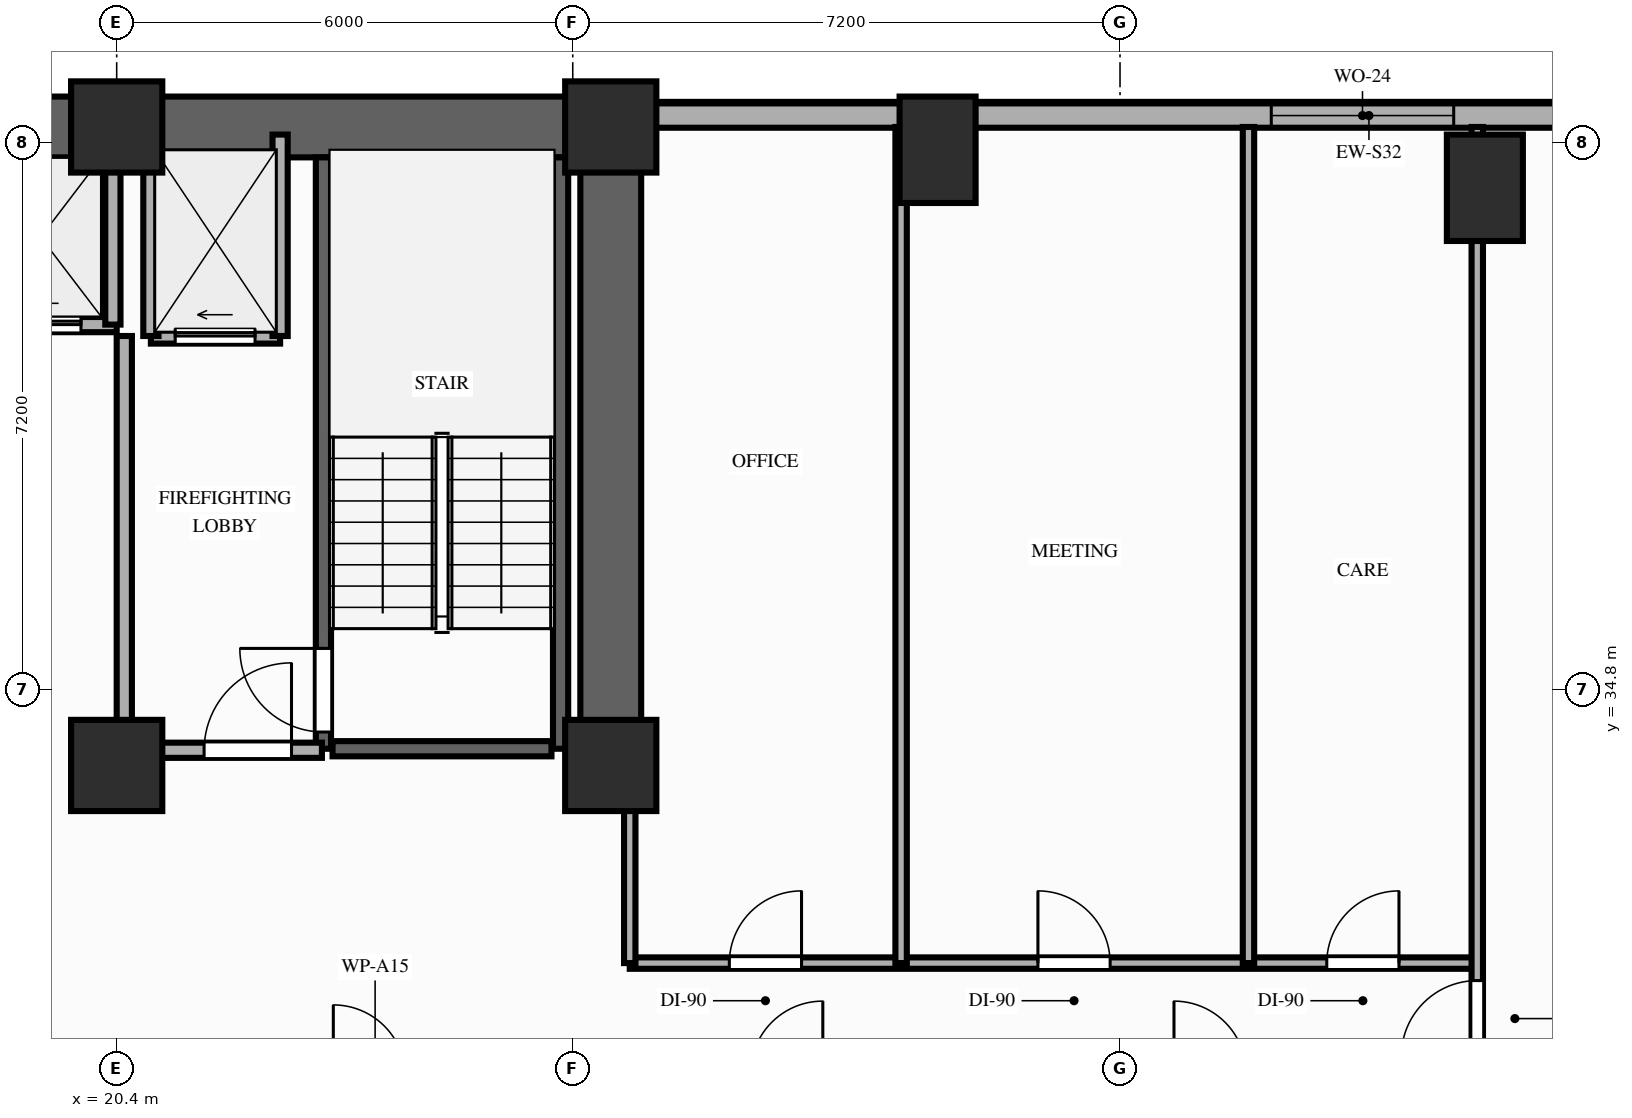
"""IFC4 building model, lengths in metres.
Left out: names, types, materials, properties, quantities, classifications, styles, units other than length and angle.
Written with IfcOpenShell. Run it as: python <this file> out.ifc"""

import sys

from ifc_helpers import new_model, si_unit, direction, frame, frame_2d, origin, origin_2d, place, context, subcontext, project, spatial, rectangle, extrude, element, fill, save


model = new_model("IFC4")
c1 = context("Model", 3, precision=1e-05, world=origin(), true_north=direction((0.0, 1.0)))
c2 = subcontext(c1, "Body", "Model", "MODEL_VIEW")
j1 = project(units=[si_unit("LENGTHUNIT", "METRE"), si_unit("PLANEANGLEUNIT", "RADIAN")], contexts=[c1])
p1 = place(None, origin())
s1 = spatial("IfcSite", under=j1, at=p1, CompositionType="ELEMENT")
p2 = place(p1, origin())
s2 = spatial("IfcBuilding", under=s1, at=p2, CompositionType="ELEMENT")
p3 = place(p2, frame((0.0, 0.0, 66.0)))
s3 = spatial("IfcBuildingStorey", under=s2, at=p3, CompositionType="ELEMENT", Elevation=66.0)
for number, where, z_axis, x_axis in (
    (1, (20.4, 33.8, 0.0), (0.0, 0.0, 1.0), (1.0, 0.0, 0.0)),
    (2, (26.9, 33.8, 0.0), (0.0, 0.0, 1.0), (1.0, 0.0, 0.0)),
    (3, (20.4, 42.2, 0.0), (0.0, 0.0, 1.0), (1.0, 0.0, 0.0)),
    (4, (26.9, 42.2, 0.0), (0.0, 0.0, 1.0), (1.0, 0.0, 0.0)),
):
    element("IfcColumn", number, at=place(p3, frame(where, z_axis=z_axis, x_axis=x_axis)), inside=s3, PredefinedType="COLUMN", context=c2, shape_type="SweptSolid", body=[
        extrude(rectangle(XDim=1.2, YDim=1.2, at=origin_2d()), origin(), (0.0, 0.0, 1.0), 3.2),
    ])
for number, where, z_axis, x_axis in (
    (5, (31.2, 41.9, 0.0), (0.0, 0.0, 1.0), (1.0, 0.0, 0.0)),
    (6, (38.4, 41.4, 0.0), (0.0, 0.0, 1.0), (1.0, 0.0, 0.0)),
):
    element("IfcColumn", number, at=place(p3, frame(where, z_axis=z_axis, x_axis=x_axis)), inside=s3, PredefinedType="COLUMN", context=c2, shape_type="SweptSolid", body=[
        extrude(rectangle(XDim=1.0, YDim=1.4, at=origin_2d()), origin(), (0.0, 0.0, 1.0), 3.2),
    ])
p4 = place(p3, frame((46.4, 42.35, 0.0), z_axis=(0.0, 0.0, 1.0), x_axis=(-1.0, 0.0, 0.0)))
e7 = element("IfcWall", 7, at=p4, inside=s3, PredefinedType="STANDARD", context=c2, shape_type="SweptSolid", body=[
    extrude(rectangle(XDim=19.05, YDim=0.32, at=frame_2d((9.525, 0.0))), origin(), (0.0, 0.0, 1.0), 2.41),
])
p5 = place(p4, frame((8.41, 0.0, 0.85)))
e8 = element("IfcOpeningElement", 8, at=p5, cuts=e7, PredefinedType="OPENING", context=c2, shape_type="SweptSolid", body=[
    extrude(rectangle(XDim=2.4, YDim=1.31, at=frame_2d((1.2, 0.655))), frame((0.0, 0.17, 0.0), z_axis=(0.0, -1.0, 0.0), x_axis=(1.0, 0.0, 0.0)), (0.0, 0.0, 1.0), 0.34),
])
p6 = place(p3, frame((6.45, 42.2, 0.0), z_axis=(0.0, 0.0, 1.0), x_axis=(1.0, 0.0, 0.0)))
e9 = element("IfcWall", 9, at=p6, inside=s3, PredefinedType="SHEAR", context=c2, shape_type="SweptSolid", body=[
    extrude(rectangle(XDim=20.45, YDim=0.8, at=frame_2d((10.225, 0.0))), origin(), (0.0, 0.0, 1.0), 3.02),
])
p7 = place(p3, frame((26.9, 33.8, 0.0), z_axis=(0.0, 0.0, 1.0), x_axis=(0.0, 1.0, 0.0)))
e10 = element("IfcWall", 10, at=p7, inside=s3, PredefinedType="SHEAR", context=c2, shape_type="SweptSolid", body=[
    extrude(rectangle(XDim=7.95, YDim=0.8, at=frame_2d((3.975, 0.0))), origin(), (0.0, 0.0, 1.0), 3.02),
])
p8 = place(p3, frame((23.12, 34.02, 0.0), z_axis=(0.0, 0.0, 1.0), x_axis=(0.0, 1.0, 0.0)))
e11 = element("IfcWall", 11, at=p8, inside=s3, PredefinedType="SHEAR", context=c2, shape_type="SweptSolid", body=[
    extrude(rectangle(XDim=7.78, YDim=0.2, at=frame_2d((3.89, 0.0))), origin(), (0.0, 0.0, 1.0), 3.02),
])
p9 = place(p8, frame((0.22, 0.0, 0.0)))
e12 = element("IfcOpeningElement", 12, at=p9, cuts=e11, PredefinedType="OPENING", context=c2, shape_type="SweptSolid", body=[
    extrude(rectangle(XDim=1.1, YDim=2.15, at=frame_2d((0.55, 1.075))), frame((0.0, 0.11, 0.0), z_axis=(0.0, -1.0, 0.0), x_axis=(1.0, 0.0, 0.0)), (0.0, 0.0, 1.0), 0.22),
])
p10 = place(p3, frame((26.24, 34.02, 0.0), z_axis=(0.0, 0.0, 1.0), x_axis=(0.0, 1.0, 0.0)))
e13 = element("IfcWall", 13, at=p10, inside=s3, PredefinedType="SHEAR", context=c2, shape_type="SweptSolid", body=[
    extrude(rectangle(XDim=7.78, YDim=0.2, at=frame_2d((3.89, 0.0))), origin(), (0.0, 0.0, 1.0), 3.02),
])
p11 = place(p3, frame((23.24, 34.02, 0.0), z_axis=(0.0, 0.0, 1.0), x_axis=(1.0, 0.0, 0.0)))
e14 = element("IfcWall", 14, at=p11, inside=s3, PredefinedType="SHEAR", context=c2, shape_type="SweptSolid", body=[
    extrude(rectangle(XDim=2.88, YDim=0.2, at=frame_2d((1.44, 0.0))), origin(), (0.0, 0.0, 1.0), 3.02),
])
p12 = place(p3, frame((20.85, 39.45, 0.0), z_axis=(0.0, 0.0, 1.0), x_axis=(1.0, 0.0, 0.0)))
e15 = element("IfcWall", 15, at=p12, inside=s3, PredefinedType="MOVABLE", context=c2, shape_type="SweptSolid", body=[
    extrude(rectangle(XDim=1.7, YDim=0.2, at=frame_2d((0.85, 0.0))), origin(), (0.0, 0.0, 1.0), 3.02),
])
p13 = place(p12, frame((0.32, 0.0, 0.0)))
e16 = element("IfcOpeningElement", 16, at=p13, cuts=e15, PredefinedType="OPENING", context=c2, shape_type="SweptSolid", body=[
    extrude(rectangle(XDim=1.05, YDim=2.15, at=frame_2d((0.525, 1.075))), frame((0.0, 0.11, 0.0), z_axis=(0.0, -1.0, 0.0), x_axis=(1.0, 0.0, 0.0)), (0.0, 0.0, 1.0), 0.22),
])
for number, where, z_axis, x_axis in (
    (17, (20.85, 39.45, 0.0), (0.0, 0.0, 1.0), (0.0, 1.0, 0.0)),
    (18, (22.55, 39.45, 0.0), (0.0, 0.0, 1.0), (0.0, 1.0, 0.0)),
):
    element("IfcWall", number, at=place(p3, frame(where, z_axis=z_axis, x_axis=x_axis)), inside=s3, PredefinedType="MOVABLE", context=c2, shape_type="SweptSolid", body=[
        extrude(rectangle(XDim=2.65, YDim=0.2, at=frame_2d((1.325, 0.0))), origin(), (0.0, 0.0, 1.0), 2.41),
    ])
p14 = place(p3, frame((20.5, 34.0, 0.0), z_axis=(0.0, 0.0, 1.0), x_axis=(0.0, 1.0, 0.0)))
e19 = element("IfcWall", 19, at=p14, inside=s3, PredefinedType="PARTITIONING", context=c2, shape_type="SweptSolid", body=[
    extrude(rectangle(XDim=5.45, YDim=0.2, at=frame_2d((2.725, 0.0))), origin(), (0.0, 0.0, 1.0), 2.41),
])
p15 = place(p3, frame((20.5, 34.0, 0.0), z_axis=(0.0, 0.0, 1.0), x_axis=(1.0, 0.0, 0.0)))
e20 = element("IfcWall", 20, at=p15, inside=s3, PredefinedType="PARTITIONING", context=c2, shape_type="SweptSolid", body=[
    extrude(rectangle(XDim=2.6, YDim=0.2, at=frame_2d((1.3, 0.0))), origin(), (0.0, 0.0, 1.0), 2.41),
])
p16 = place(p15, frame((1.05, 0.0, 0.0)))
e21 = element("IfcOpeningElement", 21, at=p16, cuts=e20, PredefinedType="OPENING", context=c2, shape_type="SweptSolid", body=[
    extrude(rectangle(XDim=1.15, YDim=2.15, at=frame_2d((0.575, 1.075))), frame((0.0, 0.11, 0.0), z_axis=(0.0, -1.0, 0.0), x_axis=(1.0, 0.0, 0.0)), (0.0, 0.0, 1.0), 0.22),
])
p17 = place(p3, frame((13.0, 39.6, 0.0), z_axis=(0.0, 0.0, 1.0), x_axis=(1.0, 0.0, 0.0)))
e22 = element("IfcWall", 22, at=p17, inside=s3, PredefinedType="MOVABLE", context=c2, shape_type="SweptSolid", body=[
    extrude(rectangle(XDim=7.4, YDim=0.2, at=frame_2d((3.7, 0.0))), origin(), (0.0, 0.0, 1.0), 3.02),
])
p18 = place(p17, frame((0.47, 0.0, 0.0)))
e23 = element("IfcOpeningElement", 23, at=p18, cuts=e22, PredefinedType="OPENING", context=c2, shape_type="SweptSolid", body=[
    extrude(rectangle(XDim=1.05, YDim=2.15, at=frame_2d((0.525, 1.075))), frame((0.0, 0.11, 0.0), z_axis=(0.0, -1.0, 0.0), x_axis=(1.0, 0.0, 0.0)), (0.0, 0.0, 1.0), 0.22),
])
p19 = place(p17, frame((2.28, 0.0, 0.0)))
e24 = element("IfcOpeningElement", 24, at=p19, cuts=e22, PredefinedType="OPENING", context=c2, shape_type="SweptSolid", body=[
    extrude(rectangle(XDim=1.05, YDim=2.15, at=frame_2d((0.525, 1.075))), frame((0.0, 0.11, 0.0), z_axis=(0.0, -1.0, 0.0), x_axis=(1.0, 0.0, 0.0)), (0.0, 0.0, 1.0), 0.22),
])
p20 = place(p17, frame((4.08, 0.0, 0.0)))
e25 = element("IfcOpeningElement", 25, at=p20, cuts=e22, PredefinedType="OPENING", context=c2, shape_type="SweptSolid", body=[
    extrude(rectangle(XDim=1.05, YDim=2.15, at=frame_2d((0.525, 1.075))), frame((0.0, 0.11, 0.0), z_axis=(0.0, -1.0, 0.0), x_axis=(1.0, 0.0, 0.0)), (0.0, 0.0, 1.0), 0.22),
])
p21 = place(p17, frame((5.88, 0.0, 0.0)))
e26 = element("IfcOpeningElement", 26, at=p21, cuts=e22, PredefinedType="OPENING", context=c2, shape_type="SweptSolid", body=[
    extrude(rectangle(XDim=1.05, YDim=2.15, at=frame_2d((0.525, 1.075))), frame((0.0, 0.11, 0.0), z_axis=(0.0, -1.0, 0.0), x_axis=(1.0, 0.0, 0.0)), (0.0, 0.0, 1.0), 0.22),
])
p22 = place(p3, frame((20.35, 39.6, 0.0), z_axis=(0.0, 0.0, 1.0), x_axis=(0.0, 1.0, 0.0)))
e27 = element("IfcWall", 27, at=p22, inside=s3, PredefinedType="MOVABLE", context=c2, shape_type="SweptSolid", body=[
    extrude(rectangle(XDim=2.18, YDim=0.2, at=frame_2d((1.09, 0.0))), origin(), (0.0, 0.0, 1.0), 3.02),
])
p23 = place(p3, frame((27.15, 31.2, 0.0), z_axis=(0.0, 0.0, 1.0), x_axis=(1.0, 0.0, 0.0)))
e28 = element("IfcWall", 28, at=p23, inside=s3, PredefinedType="PARTITIONING", context=c2, shape_type="SweptSolid", body=[
    extrude(rectangle(XDim=11.15, YDim=0.15, at=frame_2d((5.575, 0.0))), origin(), (0.0, 0.0, 1.0), 2.41),
])
p24 = place(p23, frame((1.31, 0.0, 0.0)))
e29 = element("IfcOpeningElement", 29, at=p24, cuts=e28, PredefinedType="OPENING", context=c2, shape_type="SweptSolid", body=[
    extrude(rectangle(XDim=0.95, YDim=2.15, at=frame_2d((0.475, 1.075))), frame((0.0, 0.085, 0.0), z_axis=(0.0, -1.0, 0.0), x_axis=(1.0, 0.0, 0.0)), (0.0, 0.0, 1.0), 0.17),
])
p25 = place(p23, frame((5.37, 0.0, 0.0)))
e30 = element("IfcOpeningElement", 30, at=p25, cuts=e28, PredefinedType="OPENING", context=c2, shape_type="SweptSolid", body=[
    extrude(rectangle(XDim=0.95, YDim=2.15, at=frame_2d((0.475, 1.075))), frame((0.0, 0.085, 0.0), z_axis=(0.0, -1.0, 0.0), x_axis=(1.0, 0.0, 0.0)), (0.0, 0.0, 1.0), 0.17),
])
p26 = place(p23, frame((9.17, 0.0, 0.0)))
e31 = element("IfcOpeningElement", 31, at=p26, cuts=e28, PredefinedType="OPENING", context=c2, shape_type="SweptSolid", body=[
    extrude(rectangle(XDim=0.95, YDim=2.15, at=frame_2d((0.475, 1.075))), frame((0.0, 0.085, 0.0), z_axis=(0.0, -1.0, 0.0), x_axis=(1.0, 0.0, 0.0)), (0.0, 0.0, 1.0), 0.17),
])
p27 = place(p3, frame((27.15, 31.2, 0.0), z_axis=(0.0, 0.0, 1.0), x_axis=(0.0, 1.0, 0.0)))
e32 = element("IfcWall", 32, at=p27, inside=s3, PredefinedType="PARTITIONING", context=c2, shape_type="SweptSolid", body=[
    extrude(rectangle(XDim=2.48, YDim=0.15, at=frame_2d((1.24, 0.0))), origin(), (0.0, 0.0, 1.0), 2.41),
])
p28 = place(p3, frame((38.3, 26.75, 0.0), z_axis=(0.0, 0.0, 1.0), x_axis=(0.0, 1.0, 0.0)))
e33 = element("IfcWall", 33, at=p28, inside=s3, PredefinedType="PARTITIONING", context=c2, shape_type="SweptSolid", body=[
    extrude(rectangle(XDim=15.45, YDim=0.15, at=frame_2d((7.725, 0.0))), origin(), (0.0, 0.0, 1.0), 2.41),
])
p29 = place(p28, frame((3.22, 0.0, 0.0)))
e34 = element("IfcOpeningElement", 34, at=p29, cuts=e33, PredefinedType="OPENING", context=c2, shape_type="SweptSolid", body=[
    extrude(rectangle(XDim=1.0, YDim=2.15, at=frame_2d((0.5, 1.075))), frame((0.0, 0.085, 0.0), z_axis=(0.0, -1.0, 0.0), x_axis=(1.0, 0.0, 0.0)), (0.0, 0.0, 1.0), 0.17),
])
for number, where, z_axis, x_axis in (
    (35, (30.72, 31.2, 0.0), (0.0, 0.0, 1.0), (0.0, 1.0, 0.0)),
    (36, (35.29, 31.2, 0.0), (0.0, 0.0, 1.0), (0.0, 1.0, 0.0)),
):
    element("IfcWall", number, at=place(p3, frame(where, z_axis=z_axis, x_axis=x_axis)), inside=s3, PredefinedType="PARTITIONING", context=c2, shape_type="SweptSolid", body=[
        extrude(rectangle(XDim=11.0, YDim=0.15, at=frame_2d((5.5, 0.0))), origin(), (0.0, 0.0, 1.0), 2.41),
    ])
p30 = place(p5, origin())
e37 = element("IfcWindow", 37, at=p30, inside=s3, PartitioningType="SINGLE_PANEL", PredefinedType="WINDOW", context=c2, shape_type="SweptSolid", body=[
    extrude(rectangle(XDim=2.4, YDim=1.31, at=frame_2d((1.2, 0.655))), frame((0.0, 0.03, 0.0), z_axis=(0.0, -1.0, 0.0), x_axis=(1.0, 0.0, 0.0)), (0.0, 0.0, 1.0), 0.06),
])
fill(e8, e37)
p31 = place(p9, origin())
e38 = element("IfcDoor", 38, at=p31, inside=s3, OperationType="SINGLE_SWING_RIGHT", PredefinedType="DOOR", context=c2, shape_type="SweptSolid", body=[
    extrude(rectangle(XDim=1.1, YDim=2.15, at=frame_2d((0.55, 1.075))), frame((0.0, 0.025, 0.0), z_axis=(0.0, -1.0, 0.0), x_axis=(1.0, 0.0, 0.0)), (0.0, 0.0, 1.0), 0.05),
])
fill(e12, e38)
p32 = place(p13, origin())
e39 = element("IfcDoor", 39, at=p32, inside=s3, OperationType="SLIDING_TO_LEFT", PredefinedType="DOOR", context=c2, shape_type="SweptSolid", body=[
    extrude(rectangle(XDim=1.05, YDim=2.15, at=frame_2d((0.525, 1.075))), frame((0.0, 0.025, 0.0), z_axis=(0.0, -1.0, 0.0), x_axis=(1.0, 0.0, 0.0)), (0.0, 0.0, 1.0), 0.05),
])
fill(e16, e39)
p33 = place(p16, origin())
e40 = element("IfcDoor", 40, at=p33, inside=s3, OperationType="SINGLE_SWING_RIGHT", PredefinedType="DOOR", context=c2, shape_type="SweptSolid", body=[
    extrude(rectangle(XDim=1.15, YDim=2.15, at=frame_2d((0.575, 1.075))), frame((0.0, 0.025, 0.0), z_axis=(0.0, -1.0, 0.0), x_axis=(1.0, 0.0, 0.0)), (0.0, 0.0, 1.0), 0.05),
])
fill(e21, e40)
p34 = place(p21, origin())
e41 = element("IfcDoor", 41, at=p34, inside=s3, OperationType="SLIDING_TO_LEFT", PredefinedType="DOOR", context=c2, shape_type="SweptSolid", body=[
    extrude(rectangle(XDim=1.05, YDim=2.15, at=frame_2d((0.525, 1.075))), frame((0.0, 0.025, 0.0), z_axis=(0.0, -1.0, 0.0), x_axis=(1.0, 0.0, 0.0)), (0.0, 0.0, 1.0), 0.05),
])
fill(e26, e41)
p35 = place(p29, origin())
e42 = element("IfcDoor", 42, at=p35, inside=s3, OperationType="SINGLE_SWING_LEFT", PredefinedType="DOOR", context=c2, shape_type="SweptSolid", body=[
    extrude(rectangle(XDim=1.0, YDim=2.15, at=frame_2d((0.5, 1.075))), frame((0.0, 0.025, 0.0), z_axis=(0.0, -1.0, 0.0), x_axis=(1.0, 0.0, 0.0)), (0.0, 0.0, 1.0), 0.05),
])
fill(e34, e42)
p36 = place(p24, origin())
e43 = element("IfcDoor", 43, at=p36, inside=s3, OperationType="SINGLE_SWING_RIGHT", PredefinedType="DOOR", context=c2, shape_type="SweptSolid", body=[
    extrude(rectangle(XDim=0.95, YDim=2.15, at=frame_2d((0.475, 1.075))), frame((0.0, 0.025, 0.0), z_axis=(0.0, -1.0, 0.0), x_axis=(1.0, 0.0, 0.0)), (0.0, 0.0, 1.0), 0.05),
])
fill(e29, e43)
p37 = place(p25, origin())
e44 = element("IfcDoor", 44, at=p37, inside=s3, OperationType="SINGLE_SWING_LEFT", PredefinedType="DOOR", context=c2, shape_type="SweptSolid", body=[
    extrude(rectangle(XDim=0.95, YDim=2.15, at=frame_2d((0.475, 1.075))), frame((0.0, 0.025, 0.0), z_axis=(0.0, -1.0, 0.0), x_axis=(1.0, 0.0, 0.0)), (0.0, 0.0, 1.0), 0.05),
])
fill(e30, e44)
p38 = place(p26, origin())
e45 = element("IfcDoor", 45, at=p38, inside=s3, OperationType="SINGLE_SWING_RIGHT", PredefinedType="DOOR", context=c2, shape_type="SweptSolid", body=[
    extrude(rectangle(XDim=0.95, YDim=2.15, at=frame_2d((0.475, 1.075))), frame((0.0, 0.025, 0.0), z_axis=(0.0, -1.0, 0.0), x_axis=(1.0, 0.0, 0.0)), (0.0, 0.0, 1.0), 0.05),
])
fill(e31, e45)
save(model, sys.argv[1])
